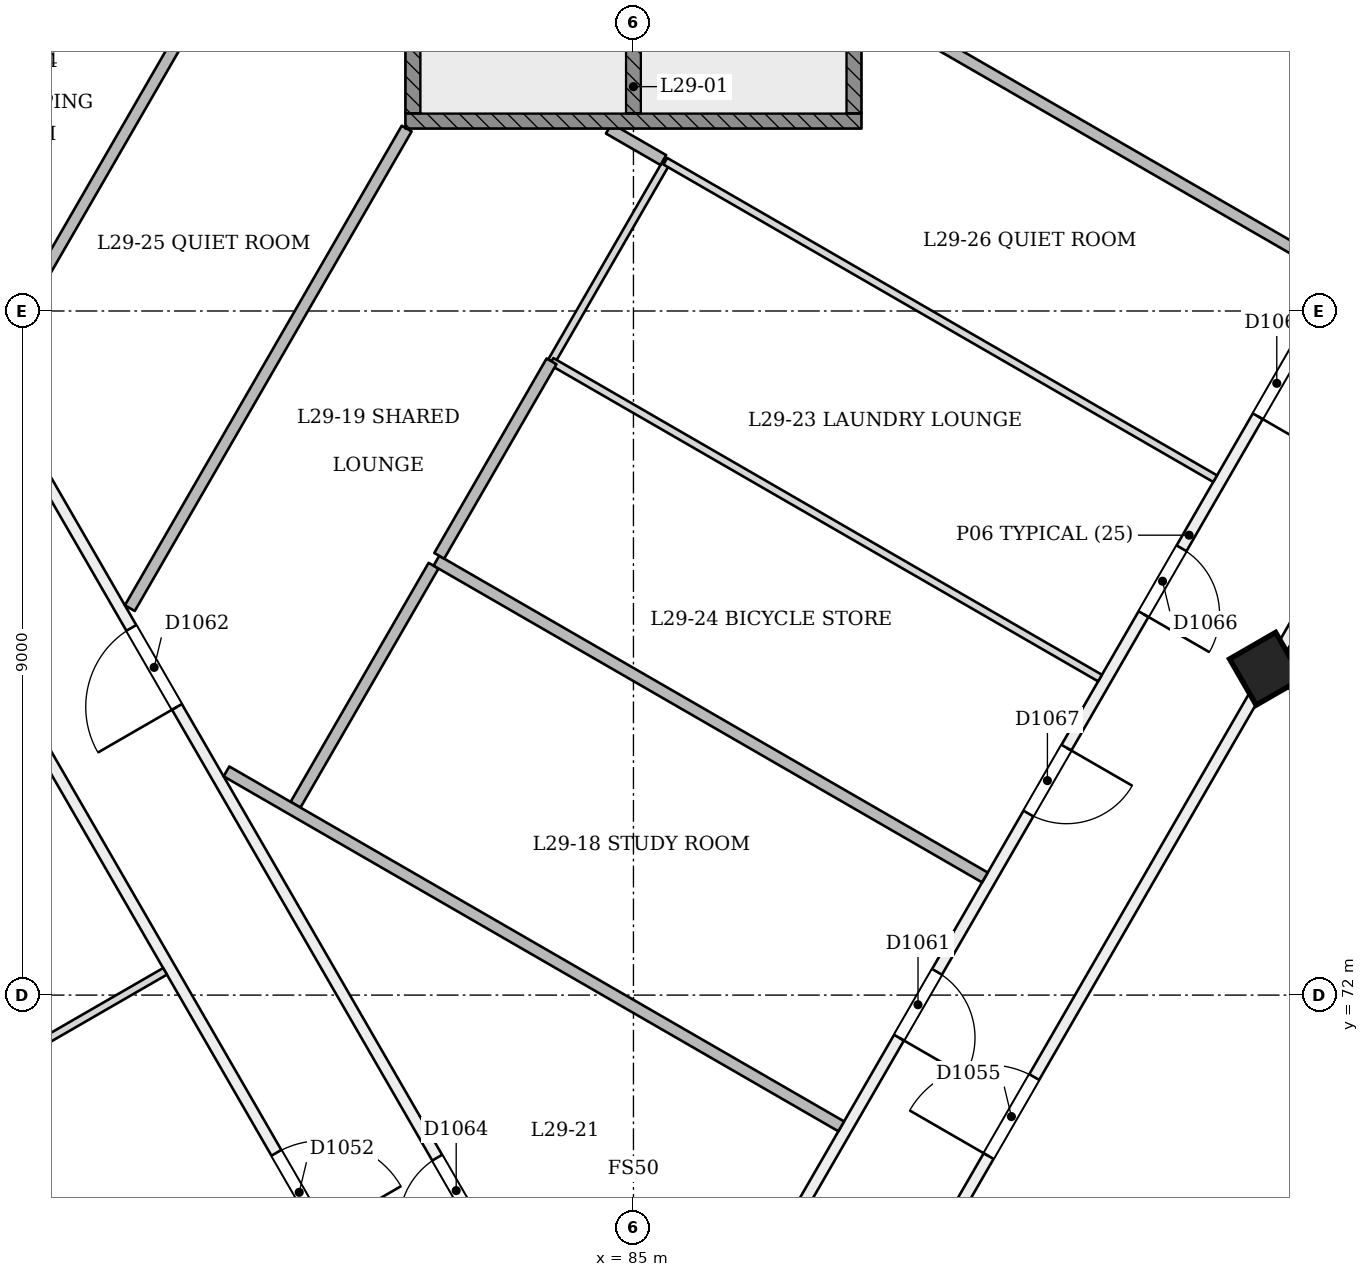
"""IFC4 building model, lengths in metres.
Left out: names, types, materials, properties, quantities, classifications, styles, units other than length and angle.
Written with IfcOpenShell. Run it as: python <this file> out.ifc"""

import sys

from ifc_helpers import new_model, si_unit, direction, frame, frame_2d, origin, origin_2d, place, context, subcontext, project, spatial, rectangle, extrude, element, fill, save


model = new_model("IFC4")
c1 = context("Model", 3, precision=1e-05, world=origin(), true_north=direction((0.0, 1.0)))
c2 = subcontext(c1, "Body", "Model", "MODEL_VIEW")
j1 = project(units=[si_unit("LENGTHUNIT", "METRE"), si_unit("PLANEANGLEUNIT", "RADIAN")], contexts=[c1])
p1 = place(None, origin())
s1 = spatial("IfcSite", under=j1, at=p1, CompositionType="ELEMENT")
p2 = place(p1, origin())
s2 = spatial("IfcBuilding", under=s1, at=p2, CompositionType="ELEMENT")
p3 = place(p2, frame((0.0, 0.0, 115.2)))
s3 = spatial("IfcBuildingStorey", under=s2, at=p3, CompositionType="ELEMENT", Elevation=115.2)
p4 = place(p3, frame((93.348, 76.246, -0.021), z_axis=(-0.02222134892, 0.038480872521, 0.999012229206), x_axis=(-0.500174577835, -0.86563950587, 0.022217955907)))
e1 = element("IfcColumn", 1, at=p4, inside=s3, PredefinedType="COLUMN", context=c2, shape_type="SweptSolid", body=[
    extrude(rectangle(XDim=0.7, YDim=0.7, at=origin_2d()), origin(), (0.0, 0.0, 1.0), 3.604),
])
p5 = place(p3, frame((99.556, 90.6, 0.0), z_axis=(0.0, 0.0, 1.0), x_axis=(-0.499996876233, -0.866027207284, 0.0)))
e2 = element("IfcWall", 2, at=p5, inside=s3, PredefinedType="PARTITIONING", context=c2, shape_type="SweptSolid", body=[
    extrude(rectangle(XDim=28.982, YDim=0.15, at=frame_2d((14.491, 0.0))), origin(), (0.0, 0.0, 1.0), 3.15),
])
p6 = place(p5, frame((2.26, 0.0, 0.0)))
e3 = element("IfcOpeningElement", 3, at=p6, cuts=e2, PredefinedType="OPENING", context=c2, shape_type="SweptSolid", body=[
    extrude(rectangle(XDim=0.9, YDim=2.1, at=frame_2d((0.45, 1.05))), frame((0.0, 0.085, 0.0), z_axis=(0.0, -1.0, 0.0), x_axis=(1.0, 0.0, 0.0)), (0.0, 0.0, 1.0), 0.171),
])
p7 = place(p5, frame((5.415, 0.0, 0.0)))
e4 = element("IfcOpeningElement", 4, at=p7, cuts=e2, PredefinedType="OPENING", context=c2, shape_type="SweptSolid", body=[
    extrude(rectangle(XDim=0.9, YDim=2.1, at=frame_2d((0.45, 1.05))), frame((0.0, 0.085, 0.0), z_axis=(0.0, -1.0, 0.0), x_axis=(1.0, 0.0, 0.0)), (0.0, 0.0, 1.0), 0.171),
])
p8 = place(p5, frame((21.124, 0.0, 0.0)))
e5 = element("IfcOpeningElement", 5, at=p8, cuts=e2, PredefinedType="OPENING", context=c2, shape_type="SweptSolid", body=[
    extrude(rectangle(XDim=1.0, YDim=2.1, at=frame_2d((0.5, 1.05))), frame((0.0, 0.085, 0.0), z_axis=(0.0, -1.0, 0.0), x_axis=(1.0, 0.0, 0.0)), (0.0, 0.0, 1.0), 0.171),
])
p9 = place(p5, frame((8.416, 0.0, 0.0)))
e6 = element("IfcOpeningElement", 6, at=p9, cuts=e2, PredefinedType="OPENING", context=c2, shape_type="SweptSolid", body=[
    extrude(rectangle(XDim=1.0, YDim=2.1, at=frame_2d((0.5, 1.05))), frame((0.0, 0.085, 0.0), z_axis=(0.0, -1.0, 0.0), x_axis=(1.0, 0.0, 0.0)), (0.0, 0.0, 1.0), 0.171),
])
p10 = place(p5, frame((14.69, 0.0, 0.0)))
e7 = element("IfcOpeningElement", 7, at=p10, cuts=e2, PredefinedType="OPENING", context=c2, shape_type="SweptSolid", body=[
    extrude(rectangle(XDim=1.0, YDim=2.1, at=frame_2d((0.5, 1.05))), frame((0.0, 0.085, 0.0), z_axis=(0.0, -1.0, 0.0), x_axis=(1.0, 0.0, 0.0)), (0.0, 0.0, 1.0), 0.171),
])
p11 = place(p5, frame((17.719, 0.0, 0.0)))
e8 = element("IfcOpeningElement", 8, at=p11, cuts=e2, PredefinedType="OPENING", context=c2, shape_type="SweptSolid", body=[
    extrude(rectangle(XDim=1.0, YDim=2.1, at=frame_2d((0.5, 1.05))), frame((0.0, 0.085, 0.0), z_axis=(0.0, -1.0, 0.0), x_axis=(1.0, 0.0, 0.0)), (0.0, 0.0, 1.0), 0.171),
])
p12 = place(p5, frame((11.684, 0.0, 0.0)))
e9 = element("IfcOpeningElement", 9, at=p12, cuts=e2, PredefinedType="OPENING", context=c2, shape_type="SweptSolid", body=[
    extrude(rectangle(XDim=1.0, YDim=2.1, at=frame_2d((0.5, 1.05))), frame((0.0, 0.085, 0.0), z_axis=(0.0, -1.0, 0.0), x_axis=(1.0, 0.0, 0.0)), (0.0, 0.0, 1.0), 0.171),
])
p13 = place(p3, frame((64.109, 97.973, 0.0), z_axis=(0.0, 0.0, 1.0), x_axis=(0.499997402089, -0.866026903684, 0.0)))
e10 = element("IfcWall", 10, at=p13, inside=s3, PredefinedType="PARTITIONING", context=c2, shape_type="SweptSolid", body=[
    extrude(rectangle(XDim=41.173, YDim=0.15, at=frame_2d((20.586, 0.0))), origin(), (0.0, 0.0, 1.0), 2.75),
])
p14 = place(p13, frame((0.273, 0.0, 0.0)))
e11 = element("IfcOpeningElement", 11, at=p14, cuts=e10, PredefinedType="OPENING", context=c2, shape_type="SweptSolid", body=[
    extrude(rectangle(XDim=1.2, YDim=2.1, at=frame_2d((0.6, 1.05))), frame((0.0, 0.085, 0.0), z_axis=(0.0, -1.0, 0.0), x_axis=(1.0, 0.0, 0.0)), (0.0, 0.0, 1.0), 0.171),
])
p15 = place(p13, frame((10.987, 0.0, 0.0)))
e12 = element("IfcOpeningElement", 12, at=p15, cuts=e10, PredefinedType="OPENING", context=c2, shape_type="SweptSolid", body=[
    extrude(rectangle(XDim=1.2, YDim=2.1, at=frame_2d((0.6, 1.05))), frame((0.0, 0.085, 0.0), z_axis=(0.0, -1.0, 0.0), x_axis=(1.0, 0.0, 0.0)), (0.0, 0.0, 1.0), 0.171),
])
p16 = place(p13, frame((22.237, 0.0, 0.0)))
e13 = element("IfcOpeningElement", 13, at=p16, cuts=e10, PredefinedType="OPENING", context=c2, shape_type="SweptSolid", body=[
    extrude(rectangle(XDim=1.2, YDim=2.1, at=frame_2d((0.6, 1.05))), frame((0.0, 0.085, 0.0), z_axis=(0.0, -1.0, 0.0), x_axis=(1.0, 0.0, 0.0)), (0.0, 0.0, 1.0), 0.171),
])
p17 = place(p13, frame((32.387, 0.0, 0.0)))
e14 = element("IfcOpeningElement", 14, at=p17, cuts=e10, PredefinedType="OPENING", context=c2, shape_type="SweptSolid", body=[
    extrude(rectangle(XDim=1.2, YDim=2.1, at=frame_2d((0.6, 1.05))), frame((0.0, 0.085, 0.0), z_axis=(0.0, -1.0, 0.0), x_axis=(1.0, 0.0, 0.0)), (0.0, 0.0, 1.0), 0.171),
])
p18 = place(p13, frame((39.95, 0.0, 0.0)))
e15 = element("IfcOpeningElement", 15, at=p18, cuts=e10, PredefinedType="OPENING", context=c2, shape_type="SweptSolid", body=[
    extrude(rectangle(XDim=1.0, YDim=2.1, at=frame_2d((0.5, 1.05))), frame((0.0, 0.085, 0.0), z_axis=(0.0, -1.0, 0.0), x_axis=(1.0, 0.0, 0.0)), (0.0, 0.0, 1.0), 0.171),
])
p19 = place(p3, frame((85.304, 62.316, 0.0), z_axis=(0.0, 0.0, 1.0), x_axis=(0.499997402089, 0.866026903684, 0.0)))
e16 = element("IfcWall", 16, at=p19, inside=s3, PredefinedType="PARTITIONING", context=c2, shape_type="SweptSolid", body=[
    extrude(rectangle(XDim=41.173, YDim=0.15, at=frame_2d((20.586, 0.0))), origin(), (0.0, 0.0, 1.0), 2.75),
])
p20 = place(p19, frame((0.248, 0.0, 0.0)))
e17 = element("IfcOpeningElement", 17, at=p20, cuts=e16, PredefinedType="OPENING", context=c2, shape_type="SweptSolid", body=[
    extrude(rectangle(XDim=1.2, YDim=2.1, at=frame_2d((0.6, 1.05))), frame((0.0, 0.085, 0.0), z_axis=(0.0, -1.0, 0.0), x_axis=(1.0, 0.0, 0.0)), (0.0, 0.0, 1.0), 0.171),
])
p21 = place(p19, frame((8.737, 0.0, 0.0)))
e18 = element("IfcOpeningElement", 18, at=p21, cuts=e16, PredefinedType="OPENING", context=c2, shape_type="SweptSolid", body=[
    extrude(rectangle(XDim=1.2, YDim=2.1, at=frame_2d((0.6, 1.05))), frame((0.0, 0.085, 0.0), z_axis=(0.0, -1.0, 0.0), x_axis=(1.0, 0.0, 0.0)), (0.0, 0.0, 1.0), 0.171),
])
p22 = place(p19, frame((22.237, 0.0, 0.0)))
e19 = element("IfcOpeningElement", 19, at=p22, cuts=e16, PredefinedType="OPENING", context=c2, shape_type="SweptSolid", body=[
    extrude(rectangle(XDim=1.2, YDim=2.1, at=frame_2d((0.6, 1.05))), frame((0.0, 0.085, 0.0), z_axis=(0.0, -1.0, 0.0), x_axis=(1.0, 0.0, 0.0)), (0.0, 0.0, 1.0), 0.171),
])
p23 = place(p19, frame((32.387, 0.0, 0.0)))
e20 = element("IfcOpeningElement", 20, at=p23, cuts=e16, PredefinedType="OPENING", context=c2, shape_type="SweptSolid", body=[
    extrude(rectangle(XDim=1.2, YDim=2.1, at=frame_2d((0.6, 1.05))), frame((0.0, 0.085, 0.0), z_axis=(0.0, -1.0, 0.0), x_axis=(1.0, 0.0, 0.0)), (0.0, 0.0, 1.0), 0.171),
])
p24 = place(p19, frame((39.725, 0.0, 0.0)))
e21 = element("IfcOpeningElement", 21, at=p24, cuts=e16, PredefinedType="OPENING", context=c2, shape_type="SweptSolid", body=[
    extrude(rectangle(XDim=1.2, YDim=2.1, at=frame_2d((0.6, 1.05))), frame((0.0, 0.085, 0.0), z_axis=(0.0, -1.0, 0.0), x_axis=(1.0, 0.0, 0.0)), (0.0, 0.0, 1.0), 0.171),
])
p25 = place(p3, frame((85.0, 65.389, 0.0), z_axis=(0.0, 0.0, 1.0), x_axis=(-0.499995893406, 0.866027774715, 0.0)))
e22 = element("IfcWall", 22, at=p25, inside=s3, PredefinedType="PARTITIONING", context=c2, shape_type="SweptSolid", body=[
    extrude(rectangle(XDim=29.112, YDim=0.15, at=frame_2d((14.556, 0.0))), origin(), (0.0, 0.0, 1.0), 3.15),
])
p26 = place(p25, frame((19.564, 0.0, 0.0)))
e23 = element("IfcOpeningElement", 23, at=p26, cuts=e22, PredefinedType="OPENING", context=c2, shape_type="SweptSolid", body=[
    extrude(rectangle(XDim=1.0, YDim=2.1, at=frame_2d((0.5, 1.05))), frame((0.0, 0.085, 0.0), z_axis=(0.0, -1.0, 0.0), x_axis=(1.0, 0.0, 0.0)), (0.0, 0.0, 1.0), 0.171),
])
p27 = place(p25, frame((12.012, 0.0, 0.0)))
e24 = element("IfcOpeningElement", 24, at=p27, cuts=e22, PredefinedType="OPENING", context=c2, shape_type="SweptSolid", body=[
    extrude(rectangle(XDim=1.2, YDim=2.1, at=frame_2d((0.6, 1.05))), frame((0.0, 0.085, 0.0), z_axis=(0.0, -1.0, 0.0), x_axis=(1.0, 0.0, 0.0)), (0.0, 0.0, 1.0), 0.171),
])
p28 = place(p25, frame((4.164, 0.0, 0.0)))
e25 = element("IfcOpeningElement", 25, at=p28, cuts=e22, PredefinedType="OPENING", context=c2, shape_type="SweptSolid", body=[
    extrude(rectangle(XDim=1.0, YDim=2.1, at=frame_2d((0.5, 1.05))), frame((0.0, 0.085, 0.0), z_axis=(0.0, -1.0, 0.0), x_axis=(1.0, 0.0, 0.0)), (0.0, 0.0, 1.0), 0.171),
])
p29 = place(p25, frame((15.899, 0.0, 0.0)))
e26 = element("IfcOpeningElement", 26, at=p29, cuts=e22, PredefinedType="OPENING", context=c2, shape_type="SweptSolid", body=[
    extrude(rectangle(XDim=1.0, YDim=2.1, at=frame_2d((0.5, 1.05))), frame((0.0, 0.085, 0.0), z_axis=(0.0, -1.0, 0.0), x_axis=(1.0, 0.0, 0.0)), (0.0, 0.0, 1.0), 0.171),
])
p30 = place(p25, frame((23.914, 0.0, 0.0)))
e27 = element("IfcOpeningElement", 27, at=p30, cuts=e22, PredefinedType="OPENING", context=c2, shape_type="SweptSolid", body=[
    extrude(rectangle(XDim=1.2, YDim=2.1, at=frame_2d((0.6, 1.05))), frame((0.0, 0.085, 0.0), z_axis=(0.0, -1.0, 0.0), x_axis=(1.0, 0.0, 0.0)), (0.0, 0.0, 1.0), 0.171),
])
p31 = place(p3, frame((92.01, 86.404, 0.0), z_axis=(0.0, 0.0, 1.0), x_axis=(0.866029912563, -0.499992190486, 0.0)))
e28 = element("IfcWall", 28, at=p31, inside=s3, PredefinedType="PARTITIONING", context=c2, shape_type="SweptSolid", body=[
    extrude(rectangle(XDim=4.361, YDim=0.1, at=frame_2d((2.181, 0.0))), origin(), (0.0, 0.0, 1.0), 3.15),
])
p32 = place(p3, frame((76.537, 80.272, 0.0), z_axis=(0.0, 0.0, 1.0), x_axis=(0.500005136037, 0.866022438472, 0.0)))
e29 = element("IfcWall", 29, at=p32, inside=s3, PredefinedType="PARTITIONING", context=c2, shape_type="SweptSolid", body=[
    extrude(rectangle(XDim=6.778, YDim=0.15, at=frame_2d((3.389, 0.0))), origin(), (0.0, 0.0, 1.0), 3.15),
])
p33 = place(p3, frame((78.616, 86.812, 0.0), z_axis=(0.0, 0.0, 1.0), x_axis=(-0.866025600969, -0.499999658466, 0.0)))
e30 = element("IfcWall", 30, at=p33, inside=s3, PredefinedType="PARTITIONING", context=c2, shape_type="SweptSolid", body=[
    extrude(rectangle(XDim=5.108, YDim=0.1, at=frame_2d((2.554, 0.0))), origin(), (0.0, 0.0, 1.0), 3.15),
])
for number, where, z_axis, x_axis in (
    (31, (73.36, 69.15, 0.0), (0.0, 0.0, 1.0), (0.866, 0.5, 0.0)),
    (32, (98.89, 73.047, 0.0), (0.0, 0.0, 1.0), (-0.866, 0.5, 0.0)),
):
    element("IfcWall", number, at=place(p3, frame(where, z_axis=z_axis, x_axis=x_axis)), inside=s3, PredefinedType="PARTITIONING", context=c2, shape_type="SweptSolid", body=[
        extrude(rectangle(XDim=6.325, YDim=0.1, at=frame_2d((3.163, 0.0))), origin(), (0.0, 0.0, 1.0), 2.65),
    ])
p34 = place(p3, frame((82.37, 77.649, 0.0), z_axis=(0.0, 0.0, 1.0), x_axis=(-0.500036737467, -0.866004192359, 0.0)))
e33 = element("IfcWall", 33, at=p34, inside=s3, PredefinedType="PARTITIONING", context=c2, shape_type="SweptSolid", body=[
    extrude(rectangle(XDim=3.631, YDim=0.15, at=frame_2d((1.815, 0.0))), origin(), (0.0, 0.0, 1.0), 3.15),
])
p35 = place(p3, frame((79.646, 74.943, 0.0), z_axis=(0.0, 0.0, 1.0), x_axis=(0.866019287913, -0.50001059285, 0.0)))
e34 = element("IfcWall", 34, at=p35, inside=s3, PredefinedType="PARTITIONING", context=c2, shape_type="SweptSolid", body=[
    extrude(rectangle(XDim=9.339, YDim=0.15, at=frame_2d((4.669, 0.0))), origin(), (0.0, 0.0, 1.0), 3.15),
])
p36 = place(p3, frame((89.624, 73.548, 0.0), z_axis=(0.0, 0.0, 1.0), x_axis=(-0.866024092089, 0.500002271917, 0.0)))
e35 = element("IfcWall", 35, at=p36, inside=s3, PredefinedType="PARTITIONING", context=c2, shape_type="SweptSolid", body=[
    extrude(rectangle(XDim=8.333, YDim=0.15, at=frame_2d((4.167, 0.0))), origin(), (0.0, 0.0, 1.0), 3.15),
])
p37 = place(p3, frame((83.922, 80.337, 0.0), z_axis=(0.0, 0.0, 1.0), x_axis=(0.499996899167, 0.866027194044, 0.0)))
e36 = element("IfcWall", 36, at=p37, inside=s3, PredefinedType="PARTITIONING", context=c2, shape_type="SweptSolid", body=[
    extrude(rectangle(XDim=3.029, YDim=0.1, at=frame_2d((1.514, 0.0))), origin(), (0.0, 0.0, 1.0), 3.15),
])
p38 = place(p3, frame((82.445, 77.779, 0.0), z_axis=(0.0, 0.0, 1.0), x_axis=(0.49999668571, 0.866027317282, 0.0)))
e37 = element("IfcWall", 37, at=p38, inside=s3, PredefinedType="PARTITIONING", context=c2, shape_type="SweptSolid", body=[
    extrude(rectangle(XDim=2.954, YDim=0.15, at=frame_2d((1.477, 0.0))), origin(), (0.0, 0.0, 1.0), 3.15),
])
p39 = place(p3, frame((82.017, 83.4, 0.0), z_axis=(0.0, 0.0, 1.0), x_axis=(-0.499998985737, -0.866025989369, 0.0)))
e38 = element("IfcWall", 38, at=p39, inside=s3, PredefinedType="PARTITIONING", context=c2, shape_type="SweptSolid", body=[
    extrude(rectangle(XDim=7.286, YDim=0.15, at=frame_2d((3.643, 0.0))), origin(), (0.0, 0.0, 1.0), 3.15),
])
p40 = place(p3, frame((85.393, 82.986, 0.0), z_axis=(0.0, 0.0, 1.0), x_axis=(-0.866151262745, 0.499781942495, 0.0)))
e39 = element("IfcWall", 39, at=p40, inside=s3, PredefinedType="PARTITIONING", context=c2, shape_type="SweptSolid", body=[
    extrude(rectangle(XDim=0.829, YDim=0.15, at=frame_2d((0.415, 0.0))), origin(), (0.0, 0.0, 1.0), 3.15),
])
p41 = place(p3, frame((88.0, 85.1, 0.0), z_axis=(0.0, 0.0, 1.0), x_axis=(0.86602143209, -0.500006879113, 0.0)))
e40 = element("IfcWall", 40, at=p41, inside=s3, PredefinedType="PARTITIONING", context=c2, shape_type="SweptSolid", body=[
    extrude(rectangle(XDim=7.183, YDim=0.15, at=frame_2d((3.591, 0.0))), origin(), (0.0, 0.0, 1.0), 3.15),
])
p42 = place(p3, frame((83.922, 80.337, 0.0), z_axis=(0.0, 0.0, 1.0), x_axis=(0.866016767205, -0.500014958696, 0.0)))
e41 = element("IfcWall", 41, at=p42, inside=s3, PredefinedType="PARTITIONING", context=c2, shape_type="SweptSolid", body=[
    extrude(rectangle(XDim=8.333, YDim=0.1, at=frame_2d((4.167, 0.0))), origin(), (0.0, 0.0, 1.0), 3.15),
])
p43 = place(p3, frame((92.653, 78.794, 0.0), z_axis=(0.0, 0.0, 1.0), x_axis=(-0.866036648346, 0.499980523342, 0.0)))
e42 = element("IfcWall", 42, at=p43, inside=s3, PredefinedType="PARTITIONING", context=c2, shape_type="SweptSolid", body=[
    extrude(rectangle(XDim=8.353, YDim=0.1, at=frame_2d((4.176, 0.0))), origin(), (0.0, 0.0, 1.0), 3.15),
])
p44 = place(p3, frame((82.0, 83.5, 0.0), z_axis=(0.0, 0.0, 1.0), x_axis=(1.0, 0.0, 0.0)))
e43 = element("IfcWall", 43, at=p44, inside=s3, PredefinedType="SOLIDWALL", context=c2, shape_type="SweptSolid", body=[
    extrude(rectangle(XDim=6.0, YDim=0.2, at=frame_2d((3.0, 0.0))), origin(), (0.0, 0.0, 1.0), 3.15),
])
for number, where, z_axis, x_axis in (
    (44, (82.1, 83.6, 0.0), (0.0, 0.0, 1.0), (0.0, 1.0, 0.0)),
    (45, (87.9, 83.6, 0.0), (0.0, 0.0, 1.0), (0.0, 1.0, 0.0)),
    (46, (85.0, 83.6, 0.0), (0.0, 0.0, 1.0), (0.0, 1.0, 0.0)),
):
    element("IfcWall", number, at=place(p3, frame(where, z_axis=z_axis, x_axis=x_axis)), inside=s3, PredefinedType="SOLIDWALL", context=c2, shape_type="SweptSolid", body=[
        extrude(rectangle(XDim=6.8, YDim=0.2, at=frame_2d((3.4, 0.0))), origin(), (0.0, 0.0, 1.0), 3.15),
    ])
p45 = place(p17, origin())
e47 = element("IfcDoor", 47, at=p45, inside=s3, OperationType="SINGLE_SWING_RIGHT", PredefinedType="NOTDEFINED", context=c2, shape_type="SweptSolid", body=[
    extrude(rectangle(XDim=1.2, YDim=2.1, at=frame_2d((0.6, 1.05))), frame((0.0, 0.025, 0.0), z_axis=(0.0, -1.0, 0.0), x_axis=(1.0, 0.0, 0.0)), (0.0, 0.0, 1.0), 0.05),
])
fill(e14, e47)
p46 = place(p21, origin())
e48 = element("IfcDoor", 48, at=p46, inside=s3, OperationType="SINGLE_SWING_LEFT", PredefinedType="NOTDEFINED", context=c2, shape_type="SweptSolid", body=[
    extrude(rectangle(XDim=1.2, YDim=2.1, at=frame_2d((0.6, 1.05))), frame((0.0, 0.025, 0.0), z_axis=(0.0, -1.0, 0.0), x_axis=(1.0, 0.0, 0.0)), (0.0, 0.0, 1.0), 0.05),
])
fill(e18, e48)
p47 = place(p8, origin())
e49 = element("IfcDoor", 49, at=p47, inside=s3, OperationType="SINGLE_SWING_RIGHT", PredefinedType="NOTDEFINED", context=c2, shape_type="SweptSolid", body=[
    extrude(rectangle(XDim=1.0, YDim=2.1, at=frame_2d((0.5, 1.05))), frame((0.0, 0.025, 0.0), z_axis=(0.0, -1.0, 0.0), x_axis=(1.0, 0.0, 0.0)), (0.0, 0.0, 1.0), 0.05),
])
fill(e5, e49)
p48 = place(p27, origin())
e50 = element("IfcDoor", 50, at=p48, inside=s3, OperationType="SINGLE_SWING_LEFT", PredefinedType="NOTDEFINED", context=c2, shape_type="SweptSolid", body=[
    extrude(rectangle(XDim=1.2, YDim=2.1, at=frame_2d((0.6, 1.05))), frame((0.0, 0.025, 0.0), z_axis=(0.0, -1.0, 0.0), x_axis=(1.0, 0.0, 0.0)), (0.0, 0.0, 1.0), 0.05),
])
fill(e24, e50)
p49 = place(p28, origin())
e51 = element("IfcDoor", 51, at=p49, inside=s3, OperationType="SINGLE_SWING_LEFT", PredefinedType="NOTDEFINED", context=c2, shape_type="SweptSolid", body=[
    extrude(rectangle(XDim=1.0, YDim=2.1, at=frame_2d((0.5, 1.05))), frame((0.0, 0.025, 0.0), z_axis=(0.0, -1.0, 0.0), x_axis=(1.0, 0.0, 0.0)), (0.0, 0.0, 1.0), 0.05),
])
fill(e25, e51)
p50 = place(p10, origin())
e52 = element("IfcDoor", 52, at=p50, inside=s3, OperationType="SINGLE_SWING_RIGHT", PredefinedType="NOTDEFINED", context=c2, shape_type="SweptSolid", body=[
    extrude(rectangle(XDim=1.0, YDim=2.1, at=frame_2d((0.5, 1.05))), frame((0.0, 0.025, 0.0), z_axis=(0.0, -1.0, 0.0), x_axis=(1.0, 0.0, 0.0)), (0.0, 0.0, 1.0), 0.05),
])
fill(e7, e52)
p51 = place(p11, origin())
e53 = element("IfcDoor", 53, at=p51, inside=s3, OperationType="SINGLE_SWING_LEFT", PredefinedType="NOTDEFINED", context=c2, shape_type="SweptSolid", body=[
    extrude(rectangle(XDim=1.0, YDim=2.1, at=frame_2d((0.5, 1.05))), frame((0.0, 0.025, 0.0), z_axis=(0.0, -1.0, 0.0), x_axis=(1.0, 0.0, 0.0)), (0.0, 0.0, 1.0), 0.05),
])
fill(e8, e53)
p52 = place(p12, origin())
e54 = element("IfcDoor", 54, at=p52, inside=s3, OperationType="SINGLE_SWING_RIGHT", PredefinedType="NOTDEFINED", context=c2, shape_type="SweptSolid", body=[
    extrude(rectangle(XDim=1.0, YDim=2.1, at=frame_2d((0.5, 1.05))), frame((0.0, 0.025, 0.0), z_axis=(0.0, -1.0, 0.0), x_axis=(1.0, 0.0, 0.0)), (0.0, 0.0, 1.0), 0.05),
])
fill(e9, e54)
save(model, sys.argv[1])
